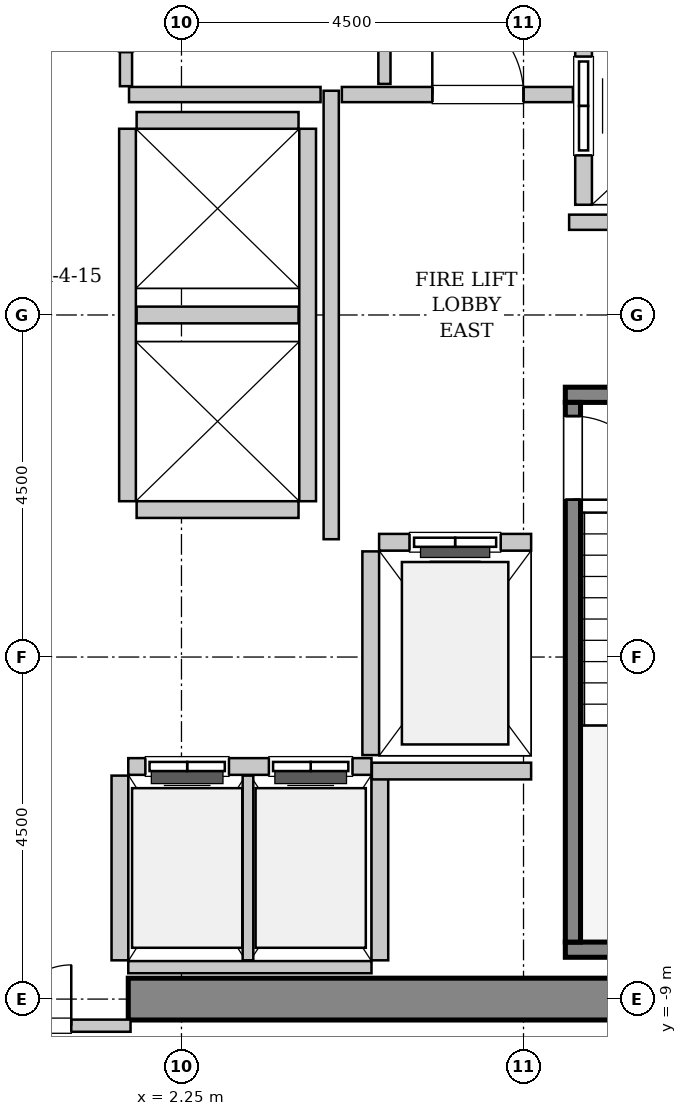
"""IFC4 building model, lengths in metres.
Left out: names, types, materials, properties, quantities, classifications, styles, units other than length and angle.
Written with IfcOpenShell. Run it as: python <this file> out.ifc"""

import sys

from ifc_helpers import new_model, si_unit, direction, frame, frame_2d, origin, place, context, subcontext, project, spatial, rectangle, extrude, source, transform, mapped, element, fill, save


model = new_model("IFC4")
c1 = context("Model", 3, precision=1e-05, world=origin(), true_north=direction((0.0, 1.0)))
c2 = subcontext(c1, "Body", "Model", "MODEL_VIEW")
j1 = project(units=[si_unit("LENGTHUNIT", "METRE"), si_unit("PLANEANGLEUNIT", "RADIAN")], contexts=[c1])
p1 = place(None, origin())
s1 = spatial("IfcSite", under=j1, at=p1, CompositionType="ELEMENT")
p2 = place(p1, origin())
s2 = spatial("IfcBuilding", under=s1, at=p2, CompositionType="ELEMENT")
p3 = place(p2, frame((0.0, 0.0, 167.8)))
s3 = spatial("IfcBuildingStorey", under=s2, at=p3, CompositionType="ELEMENT", Elevation=167.8)
m1 = source(origin(), c2, "Body", "SweptSolid", [
    extrude(rectangle(XDim=9.975, YDim=0.55, at=frame_2d((4.987, 0.0))), origin(), (0.0, 0.0, 1.0), 3.8),
])
p4 = place(p3, frame((1.55, -9.0, 0.0), z_axis=(0.0, 0.0, 1.0), x_axis=(1.0, 0.0, 0.0)))
e1 = element("IfcWall", 1, at=p4, inside=s3, PredefinedType="SHEAR", context=c2, shape_type="MappedRepresentation", body=[
    mapped(m1, transform((0.0, 0.0, 0.0), x_axis=(1.0, 0.0, 0.0), y_axis=(0.0, 1.0, 0.0), z_axis=(0.0, 0.0, 1.0), scale=1.0)),
])
m2 = source(origin(), c2, "Body", "SweptSolid", [
    extrude(rectangle(XDim=3.4, YDim=0.2, at=frame_2d((1.7, 0.0))), origin(), (0.0, 0.0, 1.0), 3.8),
])
p5 = place(p3, frame((7.3, -1.05, 0.0), z_axis=(0.0, 0.0, 1.0), x_axis=(1.0, 0.0, 0.0)))
e2 = element("IfcWall", 2, at=p5, inside=s3, PredefinedType="SOLIDWALL", context=c2, shape_type="MappedRepresentation", body=[
    mapped(m2, transform((0.0, 0.0, 0.0), x_axis=(1.0, 0.0, 0.0), y_axis=(0.0, 1.0, 0.0), z_axis=(0.0, 0.0, 1.0), scale=1.0)),
])
m3 = source(origin(), c2, "Body", "SweptSolid", [
    extrude(rectangle(XDim=3.68, YDim=0.2, at=frame_2d((1.84, 0.0))), origin(), (0.0, 0.0, 1.0), 3.8),
])
p6 = place(p3, frame((7.3, -8.35, 0.0), z_axis=(0.0, 0.0, 1.0), x_axis=(1.0, 0.0, 0.0)))
e3 = element("IfcWall", 3, at=p6, inside=s3, PredefinedType="SOLIDWALL", context=c2, shape_type="MappedRepresentation", body=[
    mapped(m3, transform((0.0, 0.0, 0.0), x_axis=(1.0, 0.0, 0.0), y_axis=(0.0, 1.0, 0.0), z_axis=(0.0, 0.0, 1.0), scale=1.0)),
])
m4 = source(origin(), c2, "Body", "SweptSolid", [
    extrude(rectangle(XDim=7.1, YDim=0.2, at=frame_2d((3.55, 0.0))), origin(), (0.0, 0.0, 1.0), 3.8),
])
p7 = place(p3, frame((7.4, -1.15, 0.0), z_axis=(0.0, 0.0, 1.0), x_axis=(0.0, -1.0, 0.0)))
e4 = element("IfcWall", 4, at=p7, inside=s3, PredefinedType="SOLIDWALL", context=c2, shape_type="MappedRepresentation", body=[
    mapped(m4, transform((0.0, 0.0, 0.0), x_axis=(1.0, 0.0, 0.0), y_axis=(0.0, 1.0, 0.0), z_axis=(0.0, 0.0, 1.0), scale=1.0)),
])
p8 = place(p7, frame((0.18, 0.0, 0.0)))
e5 = element("IfcOpeningElement", 5, at=p8, cuts=e4, PredefinedType="OPENING", context=c2, shape_type="SweptSolid", body=[
    extrude(rectangle(XDim=1.1, YDim=2.15, at=frame_2d((0.55, 1.075))), frame((0.0, 0.11, 0.0), z_axis=(0.0, -1.0, 0.0), x_axis=(1.0, 0.0, 0.0)), (0.0, 0.0, 1.0), 0.22),
])
m5 = source(origin(), c2, "Body", "SweptSolid", [
    extrude(rectangle(XDim=2.0, YDim=0.22, at=frame_2d((1.0, 0.0))), origin(), (0.0, 0.0, 1.0), 3.535),
])
p9 = place(p3, frame((6.85, -2.99, 0.0), z_axis=(0.0, 0.0, 1.0), x_axis=(-1.0, 0.0, 0.0)))
e6 = element("IfcWall", 6, at=p9, inside=s3, PredefinedType="SOLIDWALL", context=c2, shape_type="MappedRepresentation", body=[
    mapped(m5, transform((0.0, 0.0, 0.0), x_axis=(1.0, 0.0, 0.0), y_axis=(0.0, 1.0, 0.0), z_axis=(0.0, 0.0, 1.0), scale=1.0)),
])
p10 = place(p9, frame((0.4, 0.0, 0.0)))
e7 = element("IfcOpeningElement", 7, at=p10, cuts=e6, PredefinedType="OPENING", context=c2, shape_type="SweptSolid", body=[
    extrude(rectangle(XDim=1.2, YDim=2.2, at=frame_2d((0.6, 1.1))), frame((0.0, 0.12, 0.0), z_axis=(0.0, -1.0, 0.0), x_axis=(1.0, 0.0, 0.0)), (0.0, 0.0, 1.0), 0.24),
])
m6 = source(origin(), c2, "Body", "SweptSolid", [
    extrude(rectangle(XDim=2.68, YDim=0.22, at=frame_2d((1.34, 0.0))), origin(), (0.0, 0.0, 1.0), 3.535),
])
p11 = place(p3, frame((4.74, -3.11, 0.0), z_axis=(0.0, 0.0, 1.0), x_axis=(0.0, -1.0, 0.0)))
e8 = element("IfcWall", 8, at=p11, inside=s3, PredefinedType="SOLIDWALL", context=c2, shape_type="MappedRepresentation", body=[
    mapped(m6, transform((0.0, 0.0, 0.0), x_axis=(1.0, 0.0, 0.0), y_axis=(0.0, 1.0, 0.0), z_axis=(0.0, 0.0, 1.0), scale=1.0)),
])
m7 = source(origin(), c2, "Body", "SweptSolid", [
    extrude(rectangle(XDim=5.45, YDim=0.22, at=frame_2d((2.725, 0.0))), origin(), (0.0, 0.0, 1.0), 3.535),
])
p12 = place(p3, frame((7.54, 6.9, 0.0), z_axis=(0.0, 0.0, 1.0), x_axis=(0.0, -1.0, 0.0)))
e9 = element("IfcWall", 9, at=p12, inside=s3, PredefinedType="SOLIDWALL", context=c2, shape_type="MappedRepresentation", body=[
    mapped(m7, transform((0.0, 0.0, 0.0), x_axis=(1.0, 0.0, 0.0), y_axis=(0.0, 1.0, 0.0), z_axis=(0.0, 0.0, 1.0), scale=1.0)),
])
p13 = place(p12, frame((3.5, 0.0, 0.0)))
e10 = element("IfcOpeningElement", 10, at=p13, cuts=e9, PredefinedType="OPENING", context=c2, shape_type="SweptSolid", body=[
    extrude(rectangle(XDim=1.3, YDim=2.3, at=frame_2d((0.65, 1.15))), frame((0.0, 0.12, 0.0), z_axis=(0.0, -1.0, 0.0), x_axis=(1.0, 0.0, 0.0)), (0.0, 0.0, 1.0), 0.24),
])
p14 = place(p12, frame((0.65, 0.0, 0.0)))
e11 = element("IfcOpeningElement", 11, at=p14, cuts=e9, PredefinedType="OPENING", context=c2, shape_type="SweptSolid", body=[
    extrude(rectangle(XDim=1.3, YDim=2.3, at=frame_2d((0.65, 1.15))), frame((0.0, 0.12, 0.0), z_axis=(0.0, -1.0, 0.0), x_axis=(1.0, 0.0, 0.0)), (0.0, 0.0, 1.0), 0.24),
])
m8 = source(origin(), c2, "Body", "SweptSolid", [
    extrude(rectangle(XDim=3.2, YDim=0.22, at=frame_2d((1.6, 0.0))), origin(), (0.0, 0.0, 1.0), 3.535),
])
p15 = place(p3, frame((4.75, -5.94, 0.0), z_axis=(0.0, 0.0, 1.0), x_axis=(-1.0, 0.0, 0.0)))
e12 = element("IfcWall", 12, at=p15, inside=s3, PredefinedType="SOLIDWALL", context=c2, shape_type="MappedRepresentation", body=[
    mapped(m8, transform((0.0, 0.0, 0.0), x_axis=(1.0, 0.0, 0.0), y_axis=(0.0, 1.0, 0.0), z_axis=(0.0, 0.0, 1.0), scale=1.0)),
])
p16 = place(p15, frame((1.875, 0.0, 0.0)))
e13 = element("IfcOpeningElement", 13, at=p16, cuts=e12, PredefinedType="OPENING", context=c2, shape_type="SweptSolid", body=[
    extrude(rectangle(XDim=1.1, YDim=2.2, at=frame_2d((0.55, 1.1))), frame((0.0, 0.12, 0.0), z_axis=(0.0, -1.0, 0.0), x_axis=(1.0, 0.0, 0.0)), (0.0, 0.0, 1.0), 0.24),
])
p17 = place(p15, frame((0.25, 0.0, 0.0)))
e14 = element("IfcOpeningElement", 14, at=p17, cuts=e12, PredefinedType="OPENING", context=c2, shape_type="SweptSolid", body=[
    extrude(rectangle(XDim=1.1, YDim=2.2, at=frame_2d((0.55, 1.1))), frame((0.0, 0.12, 0.0), z_axis=(0.0, -1.0, 0.0), x_axis=(1.0, 0.0, 0.0)), (0.0, 0.0, 1.0), 0.24),
])
m9 = source(origin(), c2, "Body", "SweptSolid", [
    extrude(rectangle(XDim=3.2, YDim=0.16, at=frame_2d((1.6, 0.0))), origin(), (0.0, 0.0, 1.0), 2.425),
])
p18 = place(p3, frame((1.55, -8.58, 0.0), z_axis=(0.0, 0.0, 1.0), x_axis=(1.0, 0.0, 0.0)))
e15 = element("IfcWall", 15, at=p18, inside=s3, PredefinedType="PARTITIONING", context=c2, shape_type="MappedRepresentation", body=[
    mapped(m9, transform((0.0, 0.0, 0.0), x_axis=(1.0, 0.0, 0.0), y_axis=(0.0, 1.0, 0.0), z_axis=(0.0, 0.0, 1.0), scale=1.0)),
])
m10 = source(origin(), c2, "Body", "SweptSolid", [
    extrude(rectangle(XDim=2.43, YDim=0.22, at=frame_2d((1.215, 0.0))), origin(), (0.0, 0.0, 1.0), 3.535),
])
p19 = place(p3, frame((1.44, -6.06, 0.0), z_axis=(0.0, 0.0, 1.0), x_axis=(0.0, -1.0, 0.0)))
e16 = element("IfcWall", 16, at=p19, inside=s3, PredefinedType="SOLIDWALL", context=c2, shape_type="MappedRepresentation", body=[
    mapped(m10, transform((0.0, 0.0, 0.0), x_axis=(1.0, 0.0, 0.0), y_axis=(0.0, 1.0, 0.0), z_axis=(0.0, 0.0, 1.0), scale=1.0)),
])
m11 = source(origin(), c2, "Body", "SweptSolid", [
    extrude(rectangle(XDim=2.43, YDim=0.14, at=frame_2d((1.215, 0.0))), origin(), (0.0, 0.0, 1.0), 3.535),
])
p20 = place(p3, frame((3.125, -8.49, 0.0), z_axis=(0.0, 0.0, 1.0), x_axis=(0.0, 1.0, 0.0)))
e17 = element("IfcWall", 17, at=p20, inside=s3, PredefinedType="PARTITIONING", context=c2, shape_type="MappedRepresentation", body=[
    mapped(m11, transform((0.0, 0.0, 0.0), x_axis=(1.0, 0.0, 0.0), y_axis=(0.0, 1.0, 0.0), z_axis=(0.0, 0.0, 1.0), scale=1.0)),
])
p21 = place(p3, frame((4.86, -8.49, 0.0), z_axis=(0.0, 0.0, 1.0), x_axis=(0.0, 1.0, 0.0)))
e18 = element("IfcWall", 18, at=p21, inside=s3, PredefinedType="SOLIDWALL", context=c2, shape_type="MappedRepresentation", body=[
    mapped(m10, transform((0.0, 0.0, 0.0), x_axis=(1.0, 0.0, 0.0), y_axis=(0.0, 1.0, 0.0), z_axis=(0.0, 0.0, 1.0), scale=1.0)),
])
m12 = source(origin(), c2, "Body", "SweptSolid", [
    extrude(rectangle(XDim=4.9, YDim=0.22, at=frame_2d((2.45, 0.0))), origin(), (0.0, 0.0, 1.0), 3.535),
])
for number, where, z_axis, x_axis in (
    (19, (1.54, 2.45, 0.0), (0.0, 0.0, 1.0), (0.0, -1.0, 0.0)),
    (20, (3.91, -2.45, 0.0), (0.0, 0.0, 1.0), (0.0, 1.0, 0.0)),
):
    element("IfcWall", number, at=place(p3, frame(where, z_axis=z_axis, x_axis=x_axis)), inside=s3, PredefinedType="SOLIDWALL", context=c2, shape_type="MappedRepresentation", body=[
        mapped(m12, transform((0.0, 0.0, 0.0), x_axis=(1.0, 0.0, 0.0), y_axis=(0.0, 1.0, 0.0), z_axis=(0.0, 0.0, 1.0), scale=1.0)),
    ])
m13 = source(origin(), c2, "Body", "SweptSolid", [
    extrude(rectangle(XDim=2.13, YDim=0.22, at=frame_2d((1.065, 0.0))), origin(), (0.0, 0.0, 1.0), 3.535),
])
for number, where, z_axis, x_axis in (
    (21, (1.66, -2.56, 0.0), (0.0, 0.0, 1.0), (1.0, 0.0, 0.0)),
    (22, (1.66, 0.0, 0.0), (0.0, 0.0, 1.0), (1.0, 0.0, 0.0)),
    (23, (3.79, 2.56, 0.0), (0.0, 0.0, 1.0), (-1.0, 0.0, 0.0)),
):
    element("IfcWall", number, at=place(p3, frame(where, z_axis=z_axis, x_axis=x_axis)), inside=s3, PredefinedType="SOLIDWALL", context=c2, shape_type="MappedRepresentation", body=[
        mapped(m13, transform((0.0, 0.0, 0.0), x_axis=(1.0, 0.0, 0.0), y_axis=(0.0, 1.0, 0.0), z_axis=(0.0, 0.0, 1.0), scale=1.0)),
    ])
m14 = source(origin(), c2, "Body", "SweptSolid", [
    extrude(rectangle(XDim=2.095, YDim=0.22, at=frame_2d((1.048, 0.0))), origin(), (0.0, 0.0, 1.0), 3.535),
])
p22 = place(p3, frame((4.755, -6.0, 0.0), z_axis=(0.0, 0.0, 1.0), x_axis=(1.0, 0.0, 0.0)))
e24 = element("IfcWall", 24, at=p22, inside=s3, PredefinedType="SOLIDWALL", context=c2, shape_type="MappedRepresentation", body=[
    mapped(m14, transform((0.0, 0.0, 0.0), x_axis=(1.0, 0.0, 0.0), y_axis=(0.0, 1.0, 0.0), z_axis=(0.0, 0.0, 1.0), scale=1.0)),
])
m15 = source(origin(), c2, "Body", "SweptSolid", [
    extrude(rectangle(XDim=5.9, YDim=0.2, at=frame_2d((2.95, 0.0))), origin(), (0.0, 0.0, 1.0), 3.535),
])
p23 = place(p3, frame((4.22, -2.95, 0.0), z_axis=(0.0, 0.0, 1.0), x_axis=(0.0, 1.0, 0.0)))
e25 = element("IfcWall", 25, at=p23, inside=s3, PredefinedType="PARTITIONING", context=c2, shape_type="MappedRepresentation", body=[
    mapped(m15, transform((0.0, 0.0, 0.0), x_axis=(1.0, 0.0, 0.0), y_axis=(0.0, 1.0, 0.0), z_axis=(0.0, 0.0, 1.0), scale=1.0)),
])
m16 = source(origin(), c2, "Body", "SweptSolid", [
    extrude(rectangle(XDim=2.52, YDim=0.2, at=frame_2d((1.26, 0.0))), origin(), (0.0, 0.0, 1.0), 3.535),
])
p24 = place(p3, frame((1.56, 2.9, 0.0), z_axis=(0.0, 0.0, 1.0), x_axis=(1.0, 0.0, 0.0)))
e26 = element("IfcWall", 26, at=p24, inside=s3, PredefinedType="PARTITIONING", context=c2, shape_type="MappedRepresentation", body=[
    mapped(m16, transform((0.0, 0.0, 0.0), x_axis=(1.0, 0.0, 0.0), y_axis=(0.0, 1.0, 0.0), z_axis=(0.0, 0.0, 1.0), scale=1.0)),
])
m17 = source(origin(), c2, "Body", "SweptSolid", [
    extrude(rectangle(XDim=3.04, YDim=0.2, at=frame_2d((1.52, 0.0))), origin(), (0.0, 0.0, 1.0), 3.535),
])
p25 = place(p3, frame((4.36, 2.9, 0.0), z_axis=(0.0, 0.0, 1.0), x_axis=(1.0, 0.0, 0.0)))
e27 = element("IfcWall", 27, at=p25, inside=s3, PredefinedType="PARTITIONING", context=c2, shape_type="MappedRepresentation", body=[
    mapped(m17, transform((0.0, 0.0, 0.0), x_axis=(1.0, 0.0, 0.0), y_axis=(0.0, 1.0, 0.0), z_axis=(0.0, 0.0, 1.0), scale=1.0)),
])
p26 = place(p25, frame((1.19, 0.0, 0.0)))
e28 = element("IfcOpeningElement", 28, at=p26, cuts=e27, PredefinedType="OPENING", context=c2, shape_type="SweptSolid", body=[
    extrude(rectangle(XDim=1.2, YDim=2.15, at=frame_2d((0.6, 1.075))), frame((0.0, 0.11, 0.0), z_axis=(0.0, -1.0, 0.0), x_axis=(1.0, 0.0, 0.0)), (0.0, 0.0, 1.0), 0.22),
])
m18 = source(origin(), c2, "Body", "SweptSolid", [
    extrude(rectangle(XDim=4.11, YDim=0.2, at=frame_2d((2.055, 0.0))), origin(), (0.0, 0.0, 1.0), 3.535),
])
p27 = place(p3, frame((7.35, 1.22, 0.0), z_axis=(0.0, 0.0, 1.0), x_axis=(1.0, 0.0, 0.0)))
e29 = element("IfcWall", 29, at=p27, inside=s3, PredefinedType="PARTITIONING", context=c2, shape_type="MappedRepresentation", body=[
    mapped(m18, transform((0.0, 0.0, 0.0), x_axis=(1.0, 0.0, 0.0), y_axis=(0.0, 1.0, 0.0), z_axis=(0.0, 0.0, 1.0), scale=1.0)),
])
m19 = source(origin(), c2, "Body", "SweptSolid", [
    extrude(rectangle(XDim=3.16, YDim=0.16, at=frame_2d((1.58, 0.0))), origin(), (0.0, 0.0, 1.0), 2.425),
])
p28 = place(p3, frame((-1.58, -9.35, 0.0), z_axis=(0.0, 0.0, 1.0), x_axis=(1.0, 0.0, 0.0)))
e30 = element("IfcWall", 30, at=p28, inside=s3, PredefinedType="PARTITIONING", context=c2, shape_type="MappedRepresentation", body=[
    mapped(m19, transform((0.0, 0.0, 0.0), x_axis=(1.0, 0.0, 0.0), y_axis=(0.0, 1.0, 0.0), z_axis=(0.0, 0.0, 1.0), scale=1.0)),
])
p29 = place(p28, frame((0.78, 0.0, 0.0)))
e31 = element("IfcOpeningElement", 31, at=p29, cuts=e30, PredefinedType="OPENING", context=c2, shape_type="SweptSolid", body=[
    extrude(rectangle(XDim=1.6, YDim=2.3, at=frame_2d((0.8, 1.15))), frame((0.0, 0.09, 0.0), z_axis=(0.0, -1.0, 0.0), x_axis=(1.0, 0.0, 0.0)), (0.0, 0.0, 1.0), 0.18),
])
m20 = source(origin(), c2, "Body", "SweptSolid", [
    extrude(rectangle(XDim=5.45, YDim=0.16, at=frame_2d((2.725, 0.0))), origin(), (0.0, 0.0, 1.0), 3.535),
])
p30 = place(p3, frame((4.92, 3.04, 0.0), z_axis=(0.0, 0.0, 1.0), x_axis=(0.0, 1.0, 0.0)))
e32 = element("IfcWall", 32, at=p30, inside=s3, PredefinedType="PARTITIONING", context=c2, shape_type="MappedRepresentation", body=[
    mapped(m20, transform((0.0, 0.0, 0.0), x_axis=(1.0, 0.0, 0.0), y_axis=(0.0, 1.0, 0.0), z_axis=(0.0, 0.0, 1.0), scale=1.0)),
])
m21 = source(origin(), c2, "Body", "SweptSolid", [
    extrude(rectangle(XDim=1.75, YDim=0.16, at=frame_2d((0.875, 0.0))), origin(), (0.0, 0.0, 1.0), 3.535),
])
p31 = place(p3, frame((1.52, 3.01, 0.0), z_axis=(0.0, 0.0, 1.0), x_axis=(0.0, 1.0, 0.0)))
e33 = element("IfcWall", 33, at=p31, inside=s3, PredefinedType="PARTITIONING", context=c2, shape_type="MappedRepresentation", body=[
    mapped(m21, transform((0.0, 0.0, 0.0), x_axis=(1.0, 0.0, 0.0), y_axis=(0.0, 1.0, 0.0), z_axis=(0.0, 0.0, 1.0), scale=1.0)),
])
p32 = place(p31, frame((0.45, 0.0, 0.0)))
e34 = element("IfcOpeningElement", 34, at=p32, cuts=e33, PredefinedType="OPENING", context=c2, shape_type="SweptSolid", body=[
    extrude(rectangle(XDim=0.85, YDim=2.1, at=frame_2d((0.425, 1.05))), frame((0.0, 0.09, 0.0), z_axis=(0.0, -1.0, 0.0), x_axis=(1.0, 0.0, 0.0)), (0.0, 0.0, 1.0), 0.18),
])
m22 = source(origin(), c2, "Body", "SweptSolid", [
    extrude(rectangle(XDim=1.1, YDim=2.15, at=frame_2d((0.55, 1.075))), frame((0.0, 0.025, 0.0), z_axis=(0.0, -1.0, 0.0), x_axis=(1.0, 0.0, 0.0)), (0.0, 0.0, 1.0), 0.05),
])
p33 = place(p8, origin())
e35 = element("IfcDoor", 35, at=p33, inside=s3, OperationType="SINGLE_SWING_RIGHT", PredefinedType="DOOR", context=c2, shape_type="MappedRepresentation", body=[
    mapped(m22, transform((0.0, 0.0, 0.0), x_axis=(1.0, 0.0, 0.0), y_axis=(0.0, 1.0, 0.0), z_axis=(0.0, 0.0, 1.0), scale=1.0)),
])
fill(e5, e35)
m23 = source(origin(), c2, "Body", "SweptSolid", [
    extrude(rectangle(XDim=1.2, YDim=2.2, at=frame_2d((0.6, 1.1))), frame((0.0, 0.025, 0.0), z_axis=(0.0, -1.0, 0.0), x_axis=(1.0, 0.0, 0.0)), (0.0, 0.0, 1.0), 0.05),
])
p34 = place(p10, origin())
e36 = element("IfcDoor", 36, at=p34, inside=s3, OperationType="SLIDING_TO_LEFT", PredefinedType="DOOR", context=c2, shape_type="MappedRepresentation", body=[
    mapped(m23, transform((0.0, 0.0, 0.0), x_axis=(1.0, 0.0, 0.0), y_axis=(0.0, 1.0, 0.0), z_axis=(0.0, 0.0, 1.0), scale=1.0)),
])
fill(e7, e36)
m24 = source(origin(), c2, "Body", "SweptSolid", [
    extrude(rectangle(XDim=1.3, YDim=2.3, at=frame_2d((0.65, 1.15))), frame((0.0, 0.025, 0.0), z_axis=(0.0, -1.0, 0.0), x_axis=(1.0, 0.0, 0.0)), (0.0, 0.0, 1.0), 0.05),
])
p35 = place(p13, origin())
e37 = element("IfcDoor", 37, at=p35, inside=s3, OperationType="SLIDING_TO_RIGHT", PredefinedType="DOOR", context=c2, shape_type="MappedRepresentation", body=[
    mapped(m24, transform((0.0, 0.0, 0.0), x_axis=(1.0, 0.0, 0.0), y_axis=(0.0, 1.0, 0.0), z_axis=(0.0, 0.0, 1.0), scale=1.0)),
])
fill(e10, e37)
m25 = source(origin(), c2, "Body", "SweptSolid", [
    extrude(rectangle(XDim=1.1, YDim=2.2, at=frame_2d((0.55, 1.1))), frame((0.0, 0.025, 0.0), z_axis=(0.0, -1.0, 0.0), x_axis=(1.0, 0.0, 0.0)), (0.0, 0.0, 1.0), 0.05),
])
p36 = place(p16, origin())
e38 = element("IfcDoor", 38, at=p36, inside=s3, OperationType="DOUBLE_DOOR_SLIDING", PredefinedType="DOOR", context=c2, shape_type="MappedRepresentation", body=[
    mapped(m25, transform((0.0, 0.0, 0.0), x_axis=(1.0, 0.0, 0.0), y_axis=(0.0, 1.0, 0.0), z_axis=(0.0, 0.0, 1.0), scale=1.0)),
])
fill(e13, e38)
p37 = place(p17, origin())
e39 = element("IfcDoor", 39, at=p37, inside=s3, OperationType="DOUBLE_DOOR_SLIDING", PredefinedType="DOOR", context=c2, shape_type="MappedRepresentation", body=[
    mapped(m25, transform((0.0, 0.0, 0.0), x_axis=(1.0, 0.0, 0.0), y_axis=(0.0, 1.0, 0.0), z_axis=(0.0, 0.0, 1.0), scale=1.0)),
])
fill(e14, e39)
m26 = source(origin(), c2, "Body", "SweptSolid", [
    extrude(rectangle(XDim=1.2, YDim=2.15, at=frame_2d((0.6, 1.075))), frame((0.0, 0.025, 0.0), z_axis=(0.0, -1.0, 0.0), x_axis=(1.0, 0.0, 0.0)), (0.0, 0.0, 1.0), 0.05),
])
p38 = place(p26, origin())
e40 = element("IfcDoor", 40, at=p38, inside=s3, OperationType="SINGLE_SWING_LEFT", PredefinedType="DOOR", context=c2, shape_type="MappedRepresentation", body=[
    mapped(m26, transform((0.0, 0.0, 0.0), x_axis=(1.0, 0.0, 0.0), y_axis=(0.0, 1.0, 0.0), z_axis=(0.0, 0.0, 1.0), scale=1.0)),
])
fill(e28, e40)
m27 = source(origin(), c2, "Body", "SweptSolid", [
    extrude(rectangle(XDim=1.6, YDim=2.3, at=frame_2d((0.8, 1.15))), frame((0.0, 0.025, 0.0), z_axis=(0.0, -1.0, 0.0), x_axis=(1.0, 0.0, 0.0)), (0.0, 0.0, 1.0), 0.05),
])
p39 = place(p29, origin())
e41 = element("IfcDoor", 41, at=p39, inside=s3, OperationType="DOUBLE_DOOR_SINGLE_SWING", PredefinedType="DOOR", context=c2, shape_type="MappedRepresentation", body=[
    mapped(m27, transform((0.0, 0.0, 0.0), x_axis=(1.0, 0.0, 0.0), y_axis=(0.0, 1.0, 0.0), z_axis=(0.0, 0.0, 1.0), scale=1.0)),
])
fill(e31, e41)
save(model, sys.argv[1])
